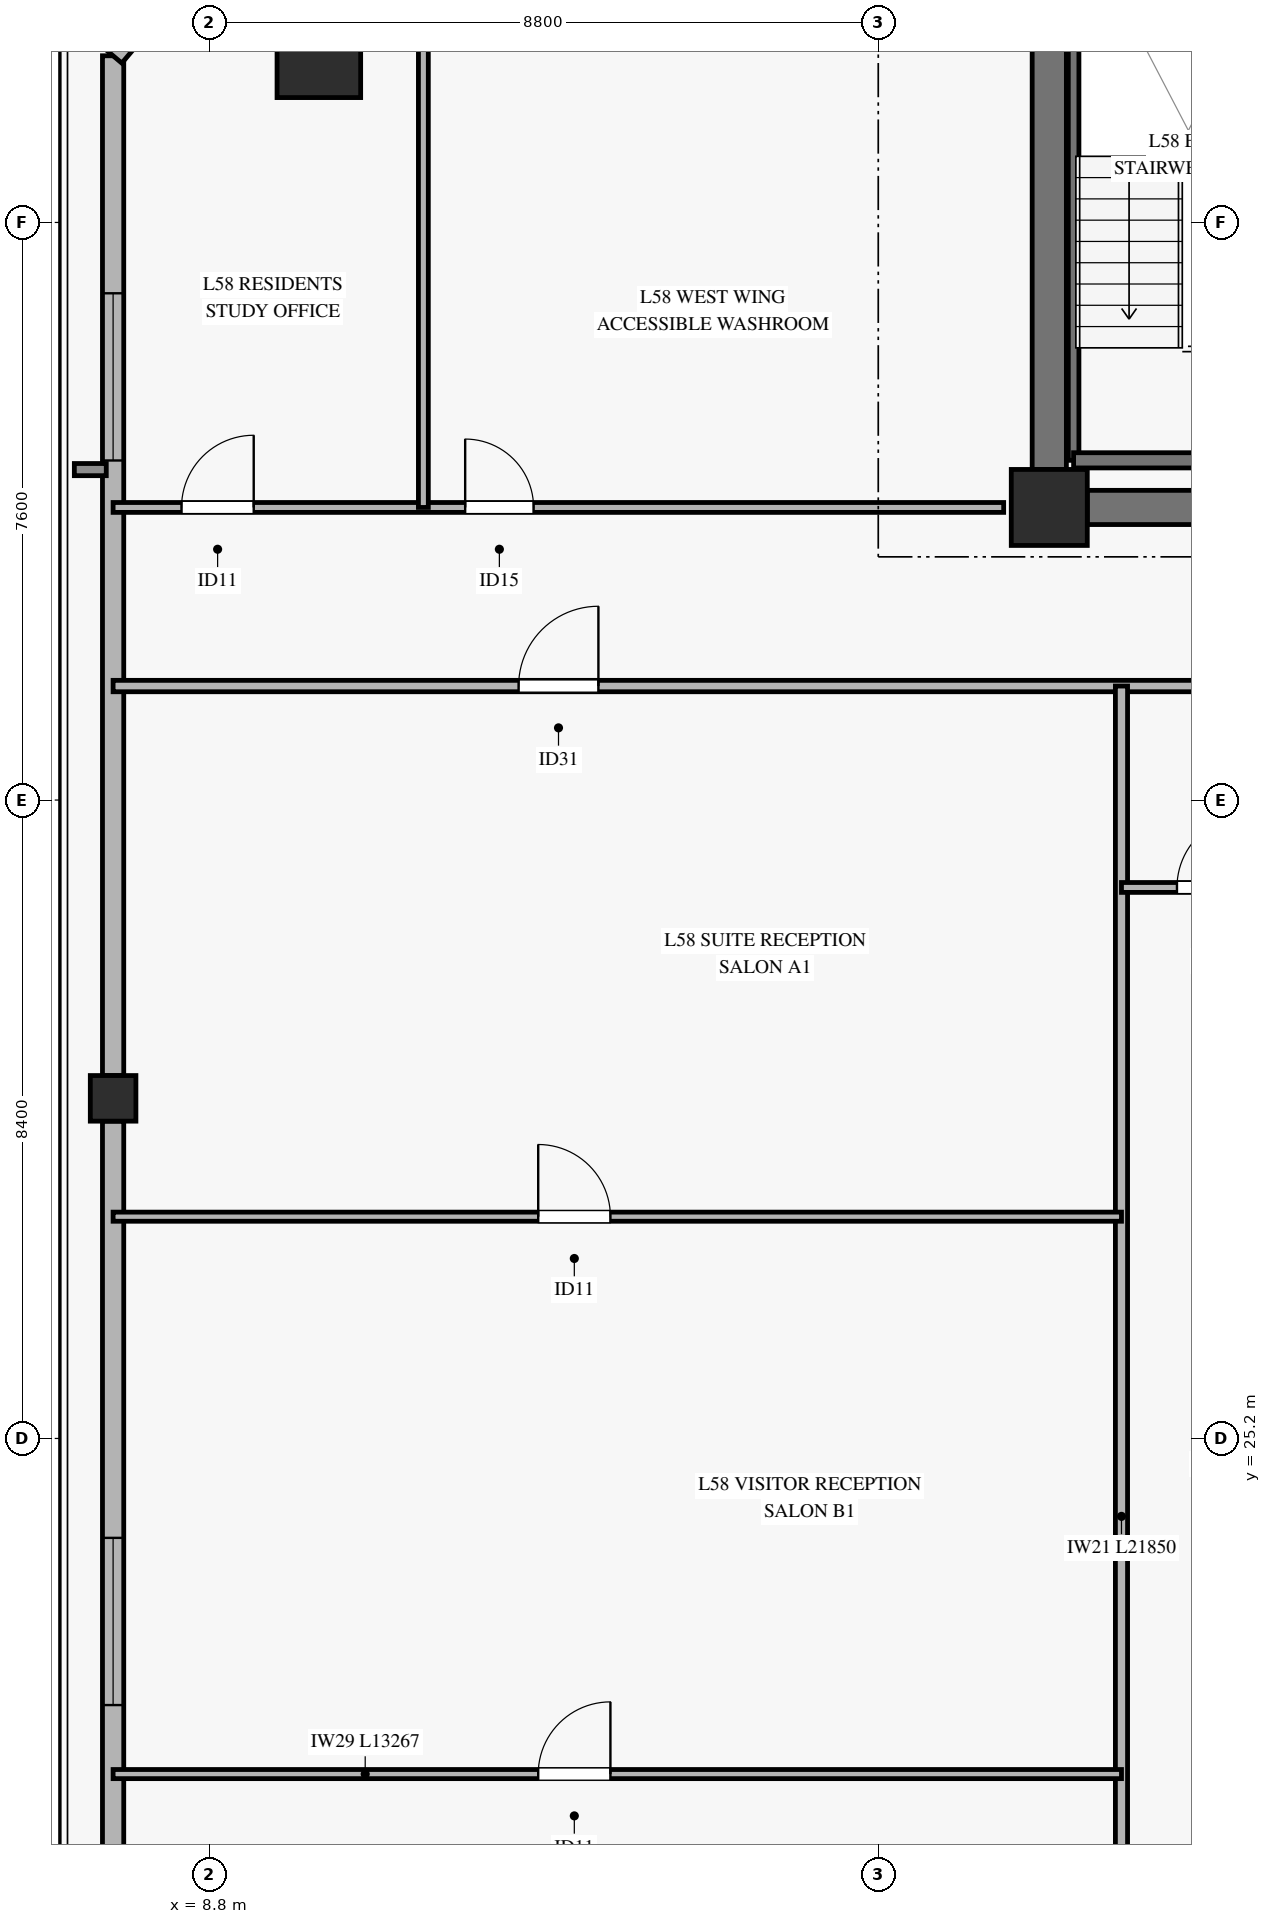
"""IFC4 building model, lengths in metres.
Left out: names, types, materials, properties, quantities, classifications, styles, units other than length and angle.
Written with IfcOpenShell. Run it as: python <this file> out.ifc"""

import sys

from ifc_helpers import new_model, si_unit, direction, frame, frame_2d, origin, origin_2d, place, context, subcontext, project, spatial, rectangle, hollow_rectangle, extrude, source, transform, mapped, element, fill, save


model = new_model("IFC4")
c1 = context("Model", 3, precision=1e-05, world=origin(), true_north=direction((0.0, 1.0)))
c2 = subcontext(c1, "Body", "Model", "MODEL_VIEW")
j1 = project(units=[si_unit("LENGTHUNIT", "METRE"), si_unit("PLANEANGLEUNIT", "RADIAN")], contexts=[c1])
p1 = place(None, origin())
s1 = spatial("IfcSite", under=j1, at=p1, CompositionType="ELEMENT")
p2 = place(p1, origin())
s2 = spatial("IfcBuilding", under=s1, at=p2, CompositionType="ELEMENT")
p3 = place(p2, frame((0.0, 0.0, 230.4)))
s3 = spatial("IfcBuildingStorey", under=s2, at=p3, CompositionType="ELEMENT", Elevation=230.4)
m1 = source(origin(), c2, "Body", "SweptSolid", [
    extrude(rectangle(XDim=1.0, YDim=1.0, at=origin_2d()), origin(), (0.0, 0.0, 1.0), 3.185),
])
p4 = place(p3, frame((19.85, 37.45, 0.0), z_axis=(0.0, 0.0, 1.0), x_axis=(1.0, 0.0, 0.0)))
e1 = element("IfcColumn", 1, at=p4, inside=s3, PredefinedType="PILASTER", context=c2, shape_type="MappedRepresentation", body=[
    mapped(m1, transform((0.0, 0.0, 0.0), x_axis=(1.0, 0.0, 0.0), y_axis=(0.0, 1.0, 0.0), z_axis=(0.0, 0.0, 1.0), scale=1.0)),
])
p5 = place(p3, frame((20.35, 37.45, 0.0), z_axis=(0.0, 0.0, 1.0), x_axis=(1.0, 0.0, 0.0)))
e2 = element("IfcWall", 2, at=p5, inside=s3, PredefinedType="SHEAR", context=c2, shape_type="SweptSolid", body=[
    extrude(rectangle(XDim=9.95, YDim=0.45, at=frame_2d((4.975, 0.0))), origin(), (0.0, 0.0, 1.0), 3.185),
])
p6 = place(p5, frame((4.2, 0.0, 0.0)))
e3 = element("IfcOpeningElement", 3, at=p6, cuts=e2, PredefinedType="OPENING", context=c2, shape_type="SweptSolid", body=[
    extrude(rectangle(XDim=1.2, YDim=2.15, at=frame_2d((0.6, 1.075))), frame((0.0, 0.235, 0.0), z_axis=(0.0, -1.0, 0.0), x_axis=(1.0, 0.0, 0.0)), (0.0, 0.0, 1.0), 0.47),
])
p7 = place(p3, frame((19.85, 37.95, 0.0), z_axis=(0.0, 0.0, 1.0), x_axis=(0.0, 1.0, 0.0)))
e4 = element("IfcWall", 4, at=p7, inside=s3, PredefinedType="SHEAR", context=c2, shape_type="SweptSolid", body=[
    extrude(rectangle(XDim=8.1, YDim=0.45, at=frame_2d((4.05, 0.0))), origin(), (0.0, 0.0, 1.0), 3.185),
])
m2 = source(origin(), c2, "Body", "SweptSolid", [
    extrude(hollow_rectangle(XDim=1.1, YDim=1.1, WallThickness=0.05, at=origin_2d()), origin(), (0.0, 0.0, 1.0), 3.185),
])
p8 = place(p3, frame((10.24, 43.393, 0.0), z_axis=(0.0, 0.0, 1.0), x_axis=(1.0, 0.0, 0.0)))
e5 = element("IfcColumn", 5, at=p8, inside=s3, PredefinedType="COLUMN", context=c2, shape_type="MappedRepresentation", body=[
    mapped(m2, transform((0.0, 0.0, 0.0), x_axis=(1.0, 0.0, 0.0), y_axis=(0.0, 1.0, 0.0), z_axis=(0.0, 0.0, 1.0), scale=1.0)),
])
m3 = source(origin(), c2, "Body", "SweptSolid", [
    extrude(hollow_rectangle(XDim=0.6, YDim=0.6, WallThickness=0.028, at=origin_2d()), origin(), (0.0, 0.0, 1.0), 3.185),
])
p9 = place(p3, frame((7.533, 29.675, 0.0), z_axis=(0.0, 0.0, 1.0), x_axis=(1.0, 0.0, 0.0)))
e6 = element("IfcColumn", 6, at=p9, inside=s3, PredefinedType="COLUMN", context=c2, shape_type="MappedRepresentation", body=[
    mapped(m3, transform((0.0, 0.0, 0.0), x_axis=(1.0, 0.0, 0.0), y_axis=(0.0, 1.0, 0.0), z_axis=(0.0, 0.0, 1.0), scale=1.0)),
])
p10 = place(p3, frame((7.533, 15.957, 0.0), z_axis=(0.0, 0.0, 1.0), x_axis=(0.0, 1.0, 0.0)))
e7 = element("IfcWall", 7, at=p10, inside=s3, PredefinedType="SOLIDWALL", context=c2, shape_type="SweptSolid", body=[
    extrude(rectangle(XDim=13.418, YDim=0.28, at=frame_2d((6.709, 0.0))), origin(), (0.0, 0.0, 1.0), 2.815),
])
p11 = place(p10, frame((1.567, 0.0, 0.45)))
e8 = element("IfcOpeningElement", 8, at=p11, cuts=e7, PredefinedType="OPENING", context=c2, shape_type="SweptSolid", body=[
    extrude(rectangle(XDim=2.2, YDim=2.1, at=frame_2d((1.1, 1.05))), frame((0.0, 0.15, 0.0), z_axis=(0.0, -1.0, 0.0), x_axis=(1.0, 0.0, 0.0)), (0.0, 0.0, 1.0), 0.3),
])
p12 = place(p10, frame((5.735, 0.0, 0.45)))
e9 = element("IfcOpeningElement", 9, at=p12, cuts=e7, PredefinedType="OPENING", context=c2, shape_type="SweptSolid", body=[
    extrude(rectangle(XDim=2.2, YDim=2.1, at=frame_2d((1.1, 1.05))), frame((0.0, 0.15, 0.0), z_axis=(0.0, -1.0, 0.0), x_axis=(1.0, 0.0, 0.0)), (0.0, 0.0, 1.0), 0.3),
])
p13 = place(p3, frame((7.533, 29.975, 0.0), z_axis=(0.0, 0.0, 1.0), x_axis=(0.0, 1.0, 0.0)))
e10 = element("IfcWall", 10, at=p13, inside=s3, PredefinedType="SOLIDWALL", context=c2, shape_type="SweptSolid", body=[
    extrude(rectangle(XDim=13.418, YDim=0.28, at=frame_2d((6.709, 0.0))), origin(), (0.0, 0.0, 1.0), 2.815),
])
p14 = place(p13, frame((8.093, 0.0, 0.45)))
e11 = element("IfcOpeningElement", 11, at=p14, cuts=e10, PredefinedType="OPENING", context=c2, shape_type="SweptSolid", body=[
    extrude(rectangle(XDim=2.2, YDim=2.1, at=frame_2d((1.1, 1.05))), frame((0.0, 0.15, 0.0), z_axis=(0.0, -1.0, 0.0), x_axis=(1.0, 0.0, 0.0)), (0.0, 0.0, 1.0), 0.3),
])
p15 = place(p3, frame((9.94, 46.25, 0.0), z_axis=(0.0, 0.0, 1.0), x_axis=(-0.644314839722, -0.764760346326, 0.0)))
e12 = element("IfcWall", 12, at=p15, inside=s3, PredefinedType="SOLIDWALL", context=c2, shape_type="SweptSolid", body=[
    extrude(rectangle(XDim=3.736, YDim=0.3, at=frame_2d((1.868, 0.0))), origin(), (0.0, 0.0, 1.0), 2.815),
])
p16 = place(p15, frame((1.068, 0.0, 0.45)))
e13 = element("IfcOpeningElement", 13, at=p16, cuts=e12, PredefinedType="OPENING", context=c2, shape_type="SweptSolid", body=[
    extrude(rectangle(XDim=1.6, YDim=2.0, at=frame_2d((0.8, 1.0))), frame((0.0, 0.16, 0.0), z_axis=(0.0, -1.0, 0.0), x_axis=(1.0, 0.0, 0.0)), (0.0, 0.0, 1.0), 0.32),
])
p17 = place(p3, frame((20.17, 38.07, 0.0), z_axis=(0.0, 0.0, 1.0), x_axis=(0.0, 1.0, 0.0)))
e14 = element("IfcWall", 14, at=p17, inside=s3, PredefinedType="SOLIDWALL", context=c2, shape_type="SweptSolid", body=[
    extrude(rectangle(XDim=7.25, YDim=0.14, at=frame_2d((3.625, 0.0))), origin(), (0.0, 0.0, 1.0), 3.4),
])
p18 = place(p3, frame((20.17, 38.07, 0.0), z_axis=(0.0, 0.0, 1.0), x_axis=(1.0, 0.0, 0.0)))
e15 = element("IfcWall", 15, at=p18, inside=s3, PredefinedType="SOLIDWALL", context=c2, shape_type="SweptSolid", body=[
    extrude(rectangle(XDim=3.05, YDim=0.2, at=frame_2d((1.525, 0.0))), origin(), (0.0, 0.0, 1.0), 3.4),
])
p19 = place(p3, frame((7.533, 35.1, 0.0), z_axis=(0.0, 0.0, 1.0), x_axis=(1.0, 0.0, 0.0)))
e16 = element("IfcWall", 16, at=p19, inside=s3, PredefinedType="PARTITIONING", context=c2, shape_type="SweptSolid", body=[
    extrude(rectangle(XDim=55.334, YDim=0.15, at=frame_2d((27.667, 0.0))), origin(), (0.0, 0.0, 1.0), 2.37),
])
p20 = place(p19, frame((5.335, 0.0, 0.0)))
e17 = element("IfcOpeningElement", 17, at=p20, cuts=e16, PredefinedType="OPENING", context=c2, shape_type="SweptSolid", body=[
    extrude(rectangle(XDim=1.05, YDim=2.15, at=frame_2d((0.525, 1.075))), frame((0.0, 0.085, 0.0), z_axis=(0.0, -1.0, 0.0), x_axis=(1.0, 0.0, 0.0)), (0.0, 0.0, 1.0), 0.17),
])
p21 = place(p19, frame((17.207, 0.0, 0.0)))
e18 = element("IfcOpeningElement", 18, at=p21, cuts=e16, PredefinedType="OPENING", context=c2, shape_type="SweptSolid", body=[
    extrude(rectangle(XDim=1.05, YDim=2.15, at=frame_2d((0.525, 1.075))), frame((0.0, 0.085, 0.0), z_axis=(0.0, -1.0, 0.0), x_axis=(1.0, 0.0, 0.0)), (0.0, 0.0, 1.0), 0.17),
])
p22 = place(p19, frame((25.884, 0.0, 0.0)))
e19 = element("IfcOpeningElement", 19, at=p22, cuts=e16, PredefinedType="OPENING", context=c2, shape_type="SweptSolid", body=[
    extrude(rectangle(XDim=1.05, YDim=2.15, at=frame_2d((0.525, 1.075))), frame((0.0, 0.085, 0.0), z_axis=(0.0, -1.0, 0.0), x_axis=(1.0, 0.0, 0.0)), (0.0, 0.0, 1.0), 0.17),
])
p23 = place(p19, frame((35.712, 0.0, 0.0)))
e20 = element("IfcOpeningElement", 20, at=p23, cuts=e16, PredefinedType="OPENING", context=c2, shape_type="SweptSolid", body=[
    extrude(rectangle(XDim=1.05, YDim=2.15, at=frame_2d((0.525, 1.075))), frame((0.0, 0.085, 0.0), z_axis=(0.0, -1.0, 0.0), x_axis=(1.0, 0.0, 0.0)), (0.0, 0.0, 1.0), 0.17),
])
p24 = place(p19, frame((47.078, 0.0, 0.0)))
e21 = element("IfcOpeningElement", 21, at=p24, cuts=e16, PredefinedType="OPENING", context=c2, shape_type="SweptSolid", body=[
    extrude(rectangle(XDim=1.05, YDim=2.15, at=frame_2d((0.525, 1.075))), frame((0.0, 0.085, 0.0), z_axis=(0.0, -1.0, 0.0), x_axis=(1.0, 0.0, 0.0)), (0.0, 0.0, 1.0), 0.17),
])
p25 = place(p3, frame((20.8, 13.25, 0.0), z_axis=(0.0, 0.0, 1.0), x_axis=(0.0, 1.0, 0.0)))
e22 = element("IfcWall", 22, at=p25, inside=s3, PredefinedType="PARTITIONING", context=c2, shape_type="SweptSolid", body=[
    extrude(rectangle(XDim=21.85, YDim=0.16, at=frame_2d((10.925, 0.0))), origin(), (0.0, 0.0, 1.0), 2.77),
])
p26 = place(p3, frame((7.533, 20.784, 0.0), z_axis=(0.0, 0.0, 1.0), x_axis=(1.0, 0.0, 0.0)))
e23 = element("IfcWall", 23, at=p26, inside=s3, PredefinedType="PARTITIONING", context=c2, shape_type="SweptSolid", body=[
    extrude(rectangle(XDim=13.267, YDim=0.12, at=frame_2d((6.634, 0.0))), origin(), (0.0, 0.0, 1.0), 2.37),
])
p27 = place(p26, frame((5.593, 0.0, 0.0)))
e24 = element("IfcOpeningElement", 24, at=p27, cuts=e23, PredefinedType="OPENING", context=c2, shape_type="SweptSolid", body=[
    extrude(rectangle(XDim=0.95, YDim=2.1, at=frame_2d((0.475, 1.05))), frame((0.0, 0.07, 0.0), z_axis=(0.0, -1.0, 0.0), x_axis=(1.0, 0.0, 0.0)), (0.0, 0.0, 1.0), 0.14),
])
p28 = place(p3, frame((7.533, 28.118, 0.0), z_axis=(0.0, 0.0, 1.0), x_axis=(1.0, 0.0, 0.0)))
e25 = element("IfcWall", 25, at=p28, inside=s3, PredefinedType="PARTITIONING", context=c2, shape_type="SweptSolid", body=[
    extrude(rectangle(XDim=13.267, YDim=0.12, at=frame_2d((6.634, 0.0))), origin(), (0.0, 0.0, 1.0), 2.37),
])
p29 = place(p28, frame((5.593, 0.0, 0.0)))
e26 = element("IfcOpeningElement", 26, at=p29, cuts=e25, PredefinedType="OPENING", context=c2, shape_type="SweptSolid", body=[
    extrude(rectangle(XDim=0.95, YDim=2.1, at=frame_2d((0.475, 1.05))), frame((0.0, 0.07, 0.0), z_axis=(0.0, -1.0, 0.0), x_axis=(1.0, 0.0, 0.0)), (0.0, 0.0, 1.0), 0.14),
])
p30 = place(p3, frame((20.8, 32.45, 0.0), z_axis=(0.0, 0.0, 1.0), x_axis=(1.0, 0.0, 0.0)))
e27 = element("IfcWall", 27, at=p30, inside=s3, PredefinedType="PARTITIONING", context=c2, shape_type="SweptSolid", body=[
    extrude(rectangle(XDim=2.17, YDim=0.13, at=frame_2d((1.085, 0.0))), origin(), (0.0, 0.0, 1.0), 2.77),
])
p31 = place(p30, frame((0.73, 0.0, 0.0)))
e28 = element("IfcOpeningElement", 28, at=p31, cuts=e27, PredefinedType="OPENING", context=c2, shape_type="SweptSolid", body=[
    extrude(rectangle(XDim=0.95, YDim=2.1, at=frame_2d((0.475, 1.05))), frame((0.0, 0.075, 0.0), z_axis=(0.0, -1.0, 0.0), x_axis=(1.0, 0.0, 0.0)), (0.0, 0.0, 1.0), 0.15),
])
p32 = place(p3, frame((7.533, 37.45, 0.0), z_axis=(0.0, 0.0, 1.0), x_axis=(1.0, 0.0, 0.0)))
e29 = element("IfcWall", 29, at=p32, inside=s3, PredefinedType="PARTITIONING", context=c2, shape_type="SweptSolid", body=[
    extrude(rectangle(XDim=11.717, YDim=0.13, at=frame_2d((5.858, 0.0))), origin(), (0.0, 0.0, 1.0), 2.82),
])
p33 = place(p32, frame((0.9, 0.0, 0.0)))
e30 = element("IfcOpeningElement", 30, at=p33, cuts=e29, PredefinedType="OPENING", context=c2, shape_type="SweptSolid", body=[
    extrude(rectangle(XDim=0.95, YDim=2.1, at=frame_2d((0.475, 1.05))), frame((0.0, 0.075, 0.0), z_axis=(0.0, -1.0, 0.0), x_axis=(1.0, 0.0, 0.0)), (0.0, 0.0, 1.0), 0.15),
])
p34 = place(p32, frame((4.632, 0.0, 0.0)))
e31 = element("IfcOpeningElement", 31, at=p34, cuts=e29, PredefinedType="OPENING", context=c2, shape_type="SweptSolid", body=[
    extrude(rectangle(XDim=0.9, YDim=2.1, at=frame_2d((0.45, 1.05))), frame((0.0, 0.075, 0.0), z_axis=(0.0, -1.0, 0.0), x_axis=(1.0, 0.0, 0.0)), (0.0, 0.0, 1.0), 0.15),
])
p35 = place(p3, frame((11.615, 37.45, 0.0), z_axis=(0.0, 0.0, 1.0), x_axis=(0.0, 1.0, 0.0)))
e32 = element("IfcWall", 32, at=p35, inside=s3, PredefinedType="PARTITIONING", context=c2, shape_type="SweptSolid", body=[
    extrude(rectangle(XDim=8.8, YDim=0.13, at=frame_2d((4.4, 0.0))), origin(), (0.0, 0.0, 1.0), 3.185),
])
m4 = source(origin(), c2, "Body", "SweptSolid", [
    extrude(rectangle(XDim=2.2, YDim=2.1, at=frame_2d((1.1, 1.05))), frame((0.0, 0.03, 0.0), z_axis=(0.0, -1.0, 0.0), x_axis=(1.0, 0.0, 0.0)), (0.0, 0.0, 1.0), 0.06),
])
p36 = place(p12, origin())
e33 = element("IfcWindow", 33, at=p36, inside=s3, PartitioningType="SINGLE_PANEL", PredefinedType="WINDOW", context=c2, shape_type="MappedRepresentation", body=[
    mapped(m4, transform((0.0, 0.0, 0.0), x_axis=(1.0, 0.0, 0.0), y_axis=(0.0, 1.0, 0.0), z_axis=(0.0, 0.0, 1.0), scale=1.0)),
])
fill(e9, e33)
p37 = place(p14, origin())
e34 = element("IfcWindow", 34, at=p37, inside=s3, PartitioningType="SINGLE_PANEL", PredefinedType="WINDOW", context=c2, shape_type="MappedRepresentation", body=[
    mapped(m4, transform((0.0, 0.0, 0.0), x_axis=(1.0, 0.0, 0.0), y_axis=(0.0, 1.0, 0.0), z_axis=(0.0, 0.0, 1.0), scale=1.0)),
])
fill(e11, e34)
m5 = source(origin(), c2, "Body", "SweptSolid", [
    extrude(rectangle(XDim=1.05, YDim=2.15, at=frame_2d((0.525, 1.075))), frame((0.0, 0.025, 0.0), z_axis=(0.0, -1.0, 0.0), x_axis=(1.0, 0.0, 0.0)), (0.0, 0.0, 1.0), 0.05),
])
p38 = place(p20, origin())
e35 = element("IfcDoor", 35, at=p38, inside=s3, OperationType="SINGLE_SWING_RIGHT", PredefinedType="DOOR", context=c2, shape_type="MappedRepresentation", body=[
    mapped(m5, transform((0.0, 0.0, 0.0), x_axis=(1.0, 0.0, 0.0), y_axis=(0.0, 1.0, 0.0), z_axis=(0.0, 0.0, 1.0), scale=1.0)),
])
fill(e17, e35)
m6 = source(origin(), c2, "Body", "SweptSolid", [
    extrude(rectangle(XDim=0.95, YDim=2.1, at=frame_2d((0.475, 1.05))), frame((0.0, 0.025, 0.0), z_axis=(0.0, -1.0, 0.0), x_axis=(1.0, 0.0, 0.0)), (0.0, 0.0, 1.0), 0.05),
])
p39 = place(p29, origin())
e36 = element("IfcDoor", 36, at=p39, inside=s3, OperationType="SINGLE_SWING_LEFT", PredefinedType="DOOR", context=c2, shape_type="MappedRepresentation", body=[
    mapped(m6, transform((0.0, 0.0, 0.0), x_axis=(1.0, 0.0, 0.0), y_axis=(0.0, 1.0, 0.0), z_axis=(0.0, 0.0, 1.0), scale=1.0)),
])
fill(e26, e36)
p40 = place(p27, origin())
e37 = element("IfcDoor", 37, at=p40, inside=s3, OperationType="SINGLE_SWING_RIGHT", PredefinedType="DOOR", context=c2, shape_type="MappedRepresentation", body=[
    mapped(m6, transform((0.0, 0.0, 0.0), x_axis=(1.0, 0.0, 0.0), y_axis=(0.0, 1.0, 0.0), z_axis=(0.0, 0.0, 1.0), scale=1.0)),
])
fill(e24, e37)
p41 = place(p31, origin())
e38 = element("IfcDoor", 38, at=p41, inside=s3, OperationType="SINGLE_SWING_RIGHT", PredefinedType="DOOR", context=c2, shape_type="MappedRepresentation", body=[
    mapped(m6, transform((0.0, 0.0, 0.0), x_axis=(1.0, 0.0, 0.0), y_axis=(0.0, 1.0, 0.0), z_axis=(0.0, 0.0, 1.0), scale=1.0)),
])
fill(e28, e38)
p42 = place(p33, origin())
e39 = element("IfcDoor", 39, at=p42, inside=s3, OperationType="SINGLE_SWING_RIGHT", PredefinedType="DOOR", context=c2, shape_type="MappedRepresentation", body=[
    mapped(m6, transform((0.0, 0.0, 0.0), x_axis=(1.0, 0.0, 0.0), y_axis=(0.0, 1.0, 0.0), z_axis=(0.0, 0.0, 1.0), scale=1.0)),
])
fill(e30, e39)
m7 = source(origin(), c2, "Body", "SweptSolid", [
    extrude(rectangle(XDim=0.9, YDim=2.1, at=frame_2d((0.45, 1.05))), frame((0.0, 0.025, 0.0), z_axis=(0.0, -1.0, 0.0), x_axis=(1.0, 0.0, 0.0)), (0.0, 0.0, 1.0), 0.05),
])
p43 = place(p34, origin())
e40 = element("IfcDoor", 40, at=p43, inside=s3, OperationType="SINGLE_SWING_LEFT", PredefinedType="DOOR", context=c2, shape_type="MappedRepresentation", body=[
    mapped(m7, transform((0.0, 0.0, 0.0), x_axis=(1.0, 0.0, 0.0), y_axis=(0.0, 1.0, 0.0), z_axis=(0.0, 0.0, 1.0), scale=1.0)),
])
fill(e31, e40)
save(model, sys.argv[1])
